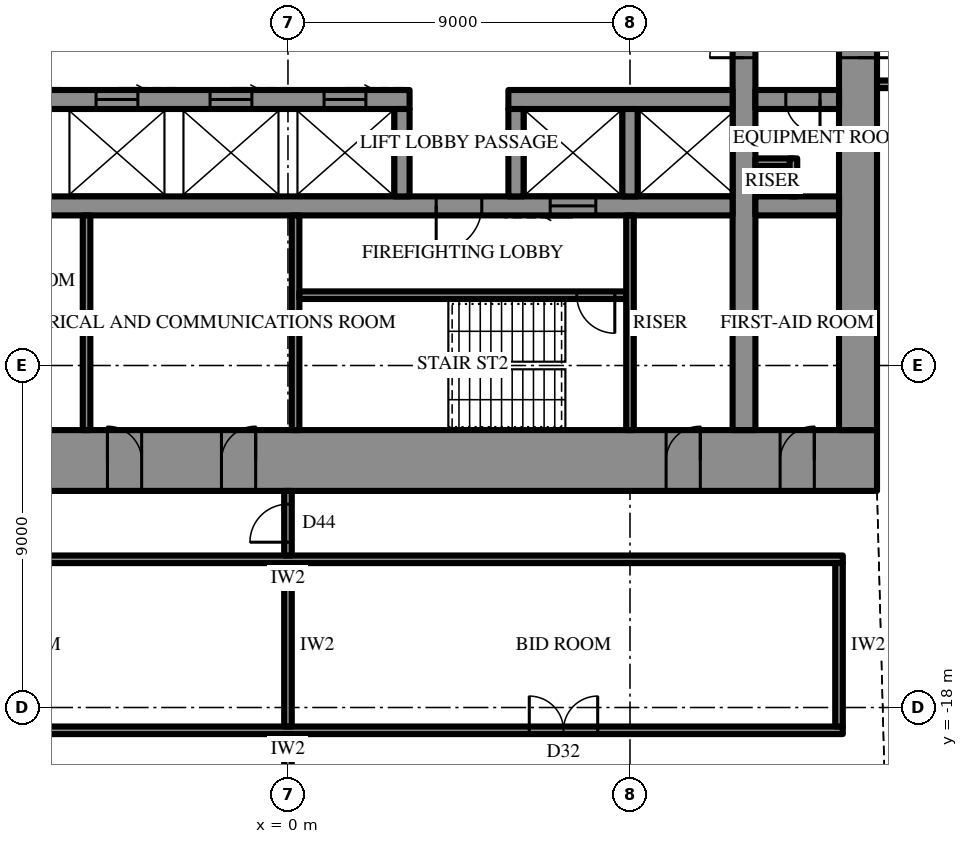
"""IFC4 building model, lengths in metres.
Left out: names, types, materials, properties, quantities, classifications, styles, units other than length and angle.
Written with IfcOpenShell. Run it as: python <this file> out.ifc"""

import sys

from ifc_helpers import new_model, si_unit, direction, frame, frame_2d, origin, place, context, subcontext, project, spatial, rectangle, extrude, element, fill, save


model = new_model("IFC4")
c1 = context("Model", 3, precision=1e-05, world=origin(), true_north=direction((0.0, 1.0)))
c2 = subcontext(c1, "Body", "Model", "MODEL_VIEW")
j1 = project(units=[si_unit("LENGTHUNIT", "METRE"), si_unit("PLANEANGLEUNIT", "RADIAN")], contexts=[c1])
p1 = place(None, origin())
s1 = spatial("IfcSite", under=j1, at=p1, CompositionType="ELEMENT")
p2 = place(p1, origin())
s2 = spatial("IfcBuilding", under=s1, at=p2, CompositionType="ELEMENT")
p3 = place(p2, frame((0.0, 0.0, 265.9)))
s3 = spatial("IfcBuildingStorey", under=s2, at=p3, CompositionType="ELEMENT", Elevation=265.9)
p4 = place(p3, frame((15.5, -11.5, 0.0), z_axis=(0.0, 0.0, 1.0), x_axis=(-1.0, 0.0, 0.0)))
e1 = element("IfcWall", 1, at=p4, inside=s3, PredefinedType="SHEAR", context=c2, shape_type="SweptSolid", body=[
    extrude(rectangle(XDim=31.0, YDim=1.6, at=frame_2d((15.5, 0.0))), origin(), (0.0, 0.0, 1.0), 4.2),
])
p5 = place(p4, frame((16.35, 0.0, 0.0)))
e2 = element("IfcOpeningElement", 2, at=p5, cuts=e1, PredefinedType="OPENING", context=c2, shape_type="SweptSolid", body=[
    extrude(rectangle(XDim=0.9, YDim=2.2, at=frame_2d((0.45, 1.1))), frame((0.0, 0.81, 0.0), z_axis=(0.0, -1.0, 0.0), x_axis=(1.0, 0.0, 0.0)), (0.0, 0.0, 1.0), 1.62),
])
p6 = place(p4, frame((19.35, 0.0, 0.0)))
e3 = element("IfcOpeningElement", 3, at=p6, cuts=e1, PredefinedType="OPENING", context=c2, shape_type="SweptSolid", body=[
    extrude(rectangle(XDim=0.9, YDim=2.2, at=frame_2d((0.45, 1.1))), frame((0.0, 0.81, 0.0), z_axis=(0.0, -1.0, 0.0), x_axis=(1.0, 0.0, 0.0)), (0.0, 0.0, 1.0), 1.62),
])
p7 = place(p4, frame((22.4, 0.0, 0.0)))
e4 = element("IfcOpeningElement", 4, at=p7, cuts=e1, PredefinedType="OPENING", context=c2, shape_type="SweptSolid", body=[
    extrude(rectangle(XDim=1.0, YDim=2.2, at=frame_2d((0.5, 1.1))), frame((0.0, 0.81, 0.0), z_axis=(0.0, -1.0, 0.0), x_axis=(1.0, 0.0, 0.0)), (0.0, 0.0, 1.0), 1.62),
])
p8 = place(p4, frame((1.65, 0.0, 0.0)))
e5 = element("IfcOpeningElement", 5, at=p8, cuts=e1, PredefinedType="OPENING", context=c2, shape_type="SweptSolid", body=[
    extrude(rectangle(XDim=0.9, YDim=2.2, at=frame_2d((0.45, 1.1))), frame((0.0, 0.81, 0.0), z_axis=(0.0, -1.0, 0.0), x_axis=(1.0, 0.0, 0.0)), (0.0, 0.0, 1.0), 1.62),
])
p9 = place(p4, frame((4.65, 0.0, 0.0)))
e6 = element("IfcOpeningElement", 6, at=p9, cuts=e1, PredefinedType="OPENING", context=c2, shape_type="SweptSolid", body=[
    extrude(rectangle(XDim=0.9, YDim=2.2, at=frame_2d((0.45, 1.1))), frame((0.0, 0.81, 0.0), z_axis=(0.0, -1.0, 0.0), x_axis=(1.0, 0.0, 0.0)), (0.0, 0.0, 1.0), 1.62),
])
p10 = place(p4, frame((25.45, 0.0, 0.0)))
e7 = element("IfcOpeningElement", 7, at=p10, cuts=e1, PredefinedType="OPENING", context=c2, shape_type="SweptSolid", body=[
    extrude(rectangle(XDim=0.9, YDim=2.2, at=frame_2d((0.45, 1.1))), frame((0.0, 0.81, 0.0), z_axis=(0.0, -1.0, 0.0), x_axis=(1.0, 0.0, 0.0)), (0.0, 0.0, 1.0), 1.62),
])
p11 = place(p4, frame((28.45, 0.0, 0.0)))
e8 = element("IfcOpeningElement", 8, at=p11, cuts=e1, PredefinedType="OPENING", context=c2, shape_type="SweptSolid", body=[
    extrude(rectangle(XDim=0.9, YDim=2.2, at=frame_2d((0.45, 1.1))), frame((0.0, 0.81, 0.0), z_axis=(0.0, -1.0, 0.0), x_axis=(1.0, 0.0, 0.0)), (0.0, 0.0, 1.0), 1.62),
])
p12 = place(p3, frame((15.0, -10.7, 0.0), z_axis=(0.0, 0.0, 1.0), x_axis=(0.0, 1.0, 0.0)))
e9 = element("IfcWall", 9, at=p12, inside=s3, PredefinedType="SHEAR", context=c2, shape_type="SweptSolid", body=[
    extrude(rectangle(XDim=21.4, YDim=1.0, at=frame_2d((10.7, 0.0))), origin(), (0.0, 0.0, 1.0), 4.2),
])
p13 = place(p12, frame((9.8, 0.0, 0.0)))
e10 = element("IfcOpeningElement", 10, at=p13, cuts=e9, PredefinedType="OPENING", context=c2, shape_type="SweptSolid", body=[
    extrude(rectangle(XDim=1.8, YDim=2.4, at=frame_2d((0.9, 1.2))), frame((0.0, 0.51, 0.0), z_axis=(0.0, -1.0, 0.0), x_axis=(1.0, 0.0, 0.0)), (0.0, 0.0, 1.0), 1.02),
])
p14 = place(p3, frame((12.0, -10.7, 0.0), z_axis=(0.0, 0.0, 1.0), x_axis=(0.0, 1.0, 0.0)))
e11 = element("IfcWall", 11, at=p14, inside=s3, PredefinedType="SHEAR", context=c2, shape_type="SweptSolid", body=[
    extrude(rectangle(XDim=21.4, YDim=0.6, at=frame_2d((10.7, 0.0))), origin(), (0.0, 0.0, 1.0), 4.2),
])
p15 = place(p14, frame((9.8, 0.0, 0.0)))
e12 = element("IfcOpeningElement", 12, at=p15, cuts=e11, PredefinedType="OPENING", context=c2, shape_type="SweptSolid", body=[
    extrude(rectangle(XDim=1.8, YDim=2.4, at=frame_2d((0.9, 1.2))), frame((0.0, 0.31, 0.0), z_axis=(0.0, -1.0, 0.0), x_axis=(1.0, 0.0, 0.0)), (0.0, 0.0, 1.0), 0.62),
])
p16 = place(p3, frame((14.5, -2.0, 0.0), z_axis=(0.0, 0.0, 1.0), x_axis=(-1.0, 0.0, 0.0)))
e13 = element("IfcWall", 13, at=p16, inside=s3, PredefinedType="SHEAR", context=c2, shape_type="SweptSolid", body=[
    extrude(rectangle(XDim=2.2, YDim=0.5, at=frame_2d((1.1, 0.0))), origin(), (0.0, 0.0, 1.0), 4.2),
])
p17 = place(p16, frame((0.5, 0.0, 0.0)))
e14 = element("IfcOpeningElement", 14, at=p17, cuts=e13, PredefinedType="OPENING", context=c2, shape_type="SweptSolid", body=[
    extrude(rectangle(XDim=0.9, YDim=2.2, at=frame_2d((0.45, 1.1))), frame((0.0, 0.26, 0.0), z_axis=(0.0, -1.0, 0.0), x_axis=(1.0, 0.0, 0.0)), (0.0, 0.0, 1.0), 0.52),
])
p18 = place(p3, frame((11.7, -2.0, 0.0), z_axis=(0.0, 0.0, 1.0), x_axis=(-1.0, 0.0, 0.0)))
e15 = element("IfcWall", 15, at=p18, inside=s3, PredefinedType="SHEAR", context=c2, shape_type="SweptSolid", body=[
    extrude(rectangle(XDim=5.9, YDim=0.5, at=frame_2d((2.95, 0.0))), origin(), (0.0, 0.0, 1.0), 4.2),
])
p19 = place(p3, frame((3.2, -2.0, 0.0), z_axis=(0.0, 0.0, 1.0), x_axis=(-1.0, 0.0, 0.0)))
e16 = element("IfcWall", 16, at=p19, inside=s3, PredefinedType="SHEAR", context=c2, shape_type="SweptSolid", body=[
    extrude(rectangle(XDim=14.9, YDim=0.5, at=frame_2d((7.45, 0.0))), origin(), (0.0, 0.0, 1.0), 4.2),
])
p20 = place(p19, frame((1.15, 0.0, 0.0)))
e17 = element("IfcOpeningElement", 17, at=p20, cuts=e16, PredefinedType="OPENING", context=c2, shape_type="SweptSolid", body=[
    extrude(rectangle(XDim=1.1, YDim=2.2, at=frame_2d((0.55, 1.1))), frame((0.0, 0.26, 0.0), z_axis=(0.0, -1.0, 0.0), x_axis=(1.0, 0.0, 0.0)), (0.0, 0.0, 1.0), 0.52),
])
p21 = place(p19, frame((4.15, 0.0, 0.0)))
e18 = element("IfcOpeningElement", 18, at=p21, cuts=e16, PredefinedType="OPENING", context=c2, shape_type="SweptSolid", body=[
    extrude(rectangle(XDim=1.1, YDim=2.2, at=frame_2d((0.55, 1.1))), frame((0.0, 0.26, 0.0), z_axis=(0.0, -1.0, 0.0), x_axis=(1.0, 0.0, 0.0)), (0.0, 0.0, 1.0), 0.52),
])
p22 = place(p19, frame((7.15, 0.0, 0.0)))
e19 = element("IfcOpeningElement", 19, at=p22, cuts=e16, PredefinedType="OPENING", context=c2, shape_type="SweptSolid", body=[
    extrude(rectangle(XDim=1.1, YDim=2.2, at=frame_2d((0.55, 1.1))), frame((0.0, 0.26, 0.0), z_axis=(0.0, -1.0, 0.0), x_axis=(1.0, 0.0, 0.0)), (0.0, 0.0, 1.0), 0.52),
])
p23 = place(p19, frame((10.15, 0.0, 0.0)))
e20 = element("IfcOpeningElement", 20, at=p23, cuts=e16, PredefinedType="OPENING", context=c2, shape_type="SweptSolid", body=[
    extrude(rectangle(XDim=1.1, YDim=2.2, at=frame_2d((0.55, 1.1))), frame((0.0, 0.26, 0.0), z_axis=(0.0, -1.0, 0.0), x_axis=(1.0, 0.0, 0.0)), (0.0, 0.0, 1.0), 0.52),
])
p24 = place(p3, frame((14.5, -4.8, 0.0), z_axis=(0.0, 0.0, 1.0), x_axis=(-1.0, 0.0, 0.0)))
e21 = element("IfcWall", 21, at=p24, inside=s3, PredefinedType="SHEAR", context=c2, shape_type="SweptSolid", body=[
    extrude(rectangle(XDim=2.2, YDim=0.5, at=frame_2d((1.1, 0.0))), origin(), (0.0, 0.0, 1.0), 4.2),
])
p25 = place(p3, frame((11.7, -4.8, 0.0), z_axis=(0.0, 0.0, 1.0), x_axis=(-1.0, 0.0, 0.0)))
e22 = element("IfcWall", 22, at=p25, inside=s3, PredefinedType="SHEAR", context=c2, shape_type="SweptSolid", body=[
    extrude(rectangle(XDim=23.4, YDim=0.5, at=frame_2d((11.7, 0.0))), origin(), (0.0, 0.0, 1.0), 4.2),
])
p26 = place(p25, frame((6.6, 0.0, 0.0)))
e23 = element("IfcOpeningElement", 23, at=p26, cuts=e22, PredefinedType="OPENING", context=c2, shape_type="SweptSolid", body=[
    extrude(rectangle(XDim=1.2, YDim=2.2, at=frame_2d((0.6, 1.1))), frame((0.0, 0.26, 0.0), z_axis=(0.0, -1.0, 0.0), x_axis=(1.0, 0.0, 0.0)), (0.0, 0.0, 1.0), 0.52),
])
p27 = place(p25, frame((3.6, 0.0, 0.0)))
e24 = element("IfcOpeningElement", 24, at=p27, cuts=e22, PredefinedType="OPENING", context=c2, shape_type="SweptSolid", body=[
    extrude(rectangle(XDim=1.2, YDim=2.2, at=frame_2d((0.6, 1.1))), frame((0.0, 0.26, 0.0), z_axis=(0.0, -1.0, 0.0), x_axis=(1.0, 0.0, 0.0)), (0.0, 0.0, 1.0), 0.52),
])
for number, where, z_axis, x_axis in (
    (25, (9.0, -2.25, 0.0), (0.0, 0.0, 1.0), (0.0, -1.0, 0.0)),
    (26, (6.0, -2.25, 0.0), (0.0, 0.0, 1.0), (0.0, -1.0, 0.0)),
    (27, (3.0, -2.25, 0.0), (0.0, 0.0, 1.0), (0.0, -1.0, 0.0)),
):
    element("IfcWall", number, at=place(p3, frame(where, z_axis=z_axis, x_axis=x_axis)), inside=s3, PredefinedType="SHEAR", context=c2, shape_type="SweptSolid", body=[
        extrude(rectangle(XDim=2.3, YDim=0.4, at=frame_2d((1.15, 0.0))), origin(), (0.0, 0.0, 1.0), 4.2),
    ])
p28 = place(p3, frame((0.2, -5.05, 0.0), z_axis=(0.0, 0.0, 1.0), x_axis=(0.0, -1.0, 0.0)))
e28 = element("IfcWall", 28, at=p28, inside=s3, PredefinedType="SHEAR", context=c2, shape_type="SweptSolid", body=[
    extrude(rectangle(XDim=5.65, YDim=0.2, at=frame_2d((2.825, 0.0))), origin(), (0.0, 0.0, 1.0), 4.2),
])
p29 = place(p3, frame((8.9, -7.15, 0.0), z_axis=(0.0, 0.0, 1.0), x_axis=(-1.0, 0.0, 0.0)))
e29 = element("IfcWall", 29, at=p29, inside=s3, PredefinedType="SHEAR", context=c2, shape_type="SweptSolid", body=[
    extrude(rectangle(XDim=8.6, YDim=0.2, at=frame_2d((4.3, 0.0))), origin(), (0.0, 0.0, 1.0), 4.2),
])
p30 = place(p29, frame((0.3, 0.0, 0.0)))
e30 = element("IfcOpeningElement", 30, at=p30, cuts=e29, PredefinedType="OPENING", context=c2, shape_type="SweptSolid", body=[
    extrude(rectangle(XDim=1.0, YDim=2.2, at=frame_2d((0.5, 1.1))), frame((0.0, 0.11, 0.0), z_axis=(0.0, -1.0, 0.0), x_axis=(1.0, 0.0, 0.0)), (0.0, 0.0, 1.0), 0.22),
])
for number, where, z_axis, x_axis in (
    (31, (9.0, -5.05, 0.0), (0.0, 0.0, 1.0), (0.0, -1.0, 0.0)),
    (32, (-5.3, -5.05, 0.0), (0.0, 0.0, 1.0), (0.0, -1.0, 0.0)),
):
    element("IfcWall", number, at=place(p3, frame(where, z_axis=z_axis, x_axis=x_axis)), inside=s3, PredefinedType="PARTITIONING", context=c2, shape_type="SweptSolid", body=[
        extrude(rectangle(XDim=5.65, YDim=0.2, at=frame_2d((2.825, 0.0))), origin(), (0.0, 0.0, 1.0), 4.0),
    ])
for number, where, z_axis, x_axis in (
    (33, (13.3, -3.65, 0.0), (0.0, 0.0, 1.0), (-1.0, 0.0, 0.0)),
    (34, (13.3, -3.55, 0.0), (0.0, 0.0, 1.0), (0.0, -1.0, 0.0)),
):
    element("IfcWall", number, at=place(p3, frame(where, z_axis=z_axis, x_axis=x_axis)), inside=s3, PredefinedType="PARTITIONING", context=c2, shape_type="SweptSolid", body=[
        extrude(rectangle(XDim=1.0, YDim=0.2, at=frame_2d((0.5, 0.0))), origin(), (0.0, 0.0, 1.0), 4.0),
    ])
p31 = place(p3, frame((14.6, -14.1, 0.0), z_axis=(0.0, 0.0, 1.0), x_axis=(-1.0, 0.0, 0.0)))
e35 = element("IfcWall", 35, at=p31, inside=s3, PredefinedType="PARTITIONING", context=c2, shape_type="SweptSolid", body=[
    extrude(rectangle(XDim=29.2, YDim=0.2, at=frame_2d((14.6, 0.0))), origin(), (0.0, 0.0, 1.0), 4.0),
])
p32 = place(p3, frame((14.6, -18.6, 0.0), z_axis=(0.0, 0.0, 1.0), x_axis=(-1.0, 0.0, 0.0)))
e36 = element("IfcWall", 36, at=p32, inside=s3, PredefinedType="PARTITIONING", context=c2, shape_type="SweptSolid", body=[
    extrude(rectangle(XDim=29.2, YDim=0.2, at=frame_2d((14.6, 0.0))), origin(), (0.0, 0.0, 1.0), 4.0),
])
p33 = place(p32, frame((6.45, 0.0, 0.0)))
e37 = element("IfcOpeningElement", 37, at=p33, cuts=e36, PredefinedType="OPENING", context=c2, shape_type="SweptSolid", body=[
    extrude(rectangle(XDim=1.8, YDim=2.4, at=frame_2d((0.9, 1.2))), frame((0.0, 0.11, 0.0), z_axis=(0.0, -1.0, 0.0), x_axis=(1.0, 0.0, 0.0)), (0.0, 0.0, 1.0), 0.22),
])
p34 = place(p32, frame((20.95, 0.0, 0.0)))
e38 = element("IfcOpeningElement", 38, at=p34, cuts=e36, PredefinedType="OPENING", context=c2, shape_type="SweptSolid", body=[
    extrude(rectangle(XDim=1.8, YDim=2.4, at=frame_2d((0.9, 1.2))), frame((0.0, 0.11, 0.0), z_axis=(0.0, -1.0, 0.0), x_axis=(1.0, 0.0, 0.0)), (0.0, 0.0, 1.0), 0.22),
])
p35 = place(p3, frame((14.5, -14.2, 0.0), z_axis=(0.0, 0.0, 1.0), x_axis=(0.0, -1.0, 0.0)))
e39 = element("IfcWall", 39, at=p35, inside=s3, PredefinedType="PARTITIONING", context=c2, shape_type="SweptSolid", body=[
    extrude(rectangle(XDim=4.3, YDim=0.2, at=frame_2d((2.15, 0.0))), origin(), (0.0, 0.0, 1.0), 4.0),
])
p36 = place(p3, frame((0.0, -14.2, 0.0), z_axis=(0.0, 0.0, 1.0), x_axis=(0.0, -1.0, 0.0)))
e40 = element("IfcWall", 40, at=p36, inside=s3, PredefinedType="PARTITIONING", context=c2, shape_type="SweptSolid", body=[
    extrude(rectangle(XDim=4.3, YDim=0.2, at=frame_2d((2.15, 0.0))), origin(), (0.0, 0.0, 1.0), 2.992),
])
p37 = place(p3, frame((15.5, -1.6, 0.0), z_axis=(0.0, 0.0, 1.0), x_axis=(1.0, 0.0, 0.0)))
e41 = element("IfcWall", 41, at=p37, inside=s3, PredefinedType="PARTITIONING", context=c2, shape_type="SweptSolid", body=[
    extrude(rectangle(XDim=9.7, YDim=0.2, at=frame_2d((4.85, 0.0))), origin(), (0.0, 0.0, 1.0), 4.0),
])
p38 = place(p37, frame((6.29, 0.0, 0.0)))
e42 = element("IfcOpeningElement", 42, at=p38, cuts=e41, PredefinedType="OPENING", context=c2, shape_type="SweptSolid", body=[
    extrude(rectangle(XDim=1.0, YDim=2.2, at=frame_2d((0.5, 1.1))), frame((0.0, 0.11, 0.0), z_axis=(0.0, -1.0, 0.0), x_axis=(1.0, 0.0, 0.0)), (0.0, 0.0, 1.0), 0.22),
])
p39 = place(p3, frame((0.0, -12.3, 0.0), z_axis=(0.0, 0.0, 1.0), x_axis=(0.0, -1.0, 0.0)))
e43 = element("IfcWall", 43, at=p39, inside=s3, PredefinedType="PARTITIONING", context=c2, shape_type="SweptSolid", body=[
    extrude(rectangle(XDim=1.7, YDim=0.2, at=frame_2d((0.85, 0.0))), origin(), (0.0, 0.0, 1.0), 2.992),
])
p40 = place(p39, frame((0.35, 0.0, 0.0)))
e44 = element("IfcOpeningElement", 44, at=p40, cuts=e43, PredefinedType="OPENING", context=c2, shape_type="SweptSolid", body=[
    extrude(rectangle(XDim=1.0, YDim=2.2, at=frame_2d((0.5, 1.1))), frame((0.0, 0.11, 0.0), z_axis=(0.0, -1.0, 0.0), x_axis=(1.0, 0.0, 0.0)), (0.0, 0.0, 1.0), 0.22),
])
p41 = place(p3, frame((0.0, -18.7, 0.0), z_axis=(0.0, 0.0, 1.0), x_axis=(0.0, -1.0, 0.0)))
e45 = element("IfcWall", 45, at=p41, inside=s3, PredefinedType="PARTITIONING", context=c2, shape_type="SweptSolid", body=[
    extrude(rectangle(XDim=9.15, YDim=0.2, at=frame_2d((4.575, 0.0))), origin(), (0.0, 0.0, 1.0), 2.992),
])
p42 = place(p13, frame((1.8, 0.0, 0.0), z_axis=(0.0, 0.0, 1.0), x_axis=(-1.0, 0.0, 0.0)))
e46 = element("IfcDoor", 46, at=p42, inside=s3, OperationType="DOUBLE_DOOR_SINGLE_SWING", PredefinedType="DOOR", context=c2, shape_type="SweptSolid", body=[
    extrude(rectangle(XDim=1.8, YDim=2.4, at=frame_2d((0.9, 1.2))), frame((0.0, 0.025, 0.0), z_axis=(0.0, -1.0, 0.0), x_axis=(1.0, 0.0, 0.0)), (0.0, 0.0, 1.0), 0.05),
])
fill(e10, e46)
p43 = place(p26, origin())
e47 = element("IfcDoor", 47, at=p43, inside=s3, OperationType="SINGLE_SWING_LEFT", PredefinedType="DOOR", context=c2, shape_type="SweptSolid", body=[
    extrude(rectangle(XDim=1.2, YDim=2.2, at=frame_2d((0.6, 1.1))), frame((0.0, 0.025, 0.0), z_axis=(0.0, -1.0, 0.0), x_axis=(1.0, 0.0, 0.0)), (0.0, 0.0, 1.0), 0.05),
])
fill(e23, e47)
p44 = place(p30, origin())
e48 = element("IfcDoor", 48, at=p44, inside=s3, OperationType="SINGLE_SWING_RIGHT", PredefinedType="DOOR", context=c2, shape_type="SweptSolid", body=[
    extrude(rectangle(XDim=1.0, YDim=2.2, at=frame_2d((0.5, 1.1))), frame((0.0, 0.025, 0.0), z_axis=(0.0, -1.0, 0.0), x_axis=(1.0, 0.0, 0.0)), (0.0, 0.0, 1.0), 0.05),
])
fill(e30, e48)
p45 = place(p5, frame((0.9, 0.0, 0.0), z_axis=(0.0, 0.0, 1.0), x_axis=(-1.0, 0.0, 0.0)))
e49 = element("IfcDoor", 49, at=p45, inside=s3, OperationType="SINGLE_SWING_LEFT", PredefinedType="DOOR", context=c2, shape_type="SweptSolid", body=[
    extrude(rectangle(XDim=0.9, YDim=2.2, at=frame_2d((0.45, 1.1))), frame((0.0, 0.025, 0.0), z_axis=(0.0, -1.0, 0.0), x_axis=(1.0, 0.0, 0.0)), (0.0, 0.0, 1.0), 0.05),
])
fill(e2, e49)
p46 = place(p6, frame((0.9, 0.0, 0.0), z_axis=(0.0, 0.0, 1.0), x_axis=(-1.0, 0.0, 0.0)))
e50 = element("IfcDoor", 50, at=p46, inside=s3, OperationType="SINGLE_SWING_RIGHT", PredefinedType="DOOR", context=c2, shape_type="SweptSolid", body=[
    extrude(rectangle(XDim=0.9, YDim=2.2, at=frame_2d((0.45, 1.1))), frame((0.0, 0.025, 0.0), z_axis=(0.0, -1.0, 0.0), x_axis=(1.0, 0.0, 0.0)), (0.0, 0.0, 1.0), 0.05),
])
fill(e3, e50)
p47 = place(p8, frame((0.9, 0.0, 0.0), z_axis=(0.0, 0.0, 1.0), x_axis=(-1.0, 0.0, 0.0)))
e51 = element("IfcDoor", 51, at=p47, inside=s3, OperationType="SINGLE_SWING_LEFT", PredefinedType="DOOR", context=c2, shape_type="SweptSolid", body=[
    extrude(rectangle(XDim=0.9, YDim=2.2, at=frame_2d((0.45, 1.1))), frame((0.0, 0.025, 0.0), z_axis=(0.0, -1.0, 0.0), x_axis=(1.0, 0.0, 0.0)), (0.0, 0.0, 1.0), 0.05),
])
fill(e5, e51)
p48 = place(p9, frame((0.9, 0.0, 0.0), z_axis=(0.0, 0.0, 1.0), x_axis=(-1.0, 0.0, 0.0)))
e52 = element("IfcDoor", 52, at=p48, inside=s3, OperationType="SINGLE_SWING_LEFT", PredefinedType="DOOR", context=c2, shape_type="SweptSolid", body=[
    extrude(rectangle(XDim=0.9, YDim=2.2, at=frame_2d((0.45, 1.1))), frame((0.0, 0.025, 0.0), z_axis=(0.0, -1.0, 0.0), x_axis=(1.0, 0.0, 0.0)), (0.0, 0.0, 1.0), 0.05),
])
fill(e6, e52)
p49 = place(p17, origin())
e53 = element("IfcDoor", 53, at=p49, inside=s3, OperationType="SINGLE_SWING_RIGHT", PredefinedType="DOOR", context=c2, shape_type="SweptSolid", body=[
    extrude(rectangle(XDim=0.9, YDim=2.2, at=frame_2d((0.45, 1.1))), frame((0.0, 0.025, 0.0), z_axis=(0.0, -1.0, 0.0), x_axis=(1.0, 0.0, 0.0)), (0.0, 0.0, 1.0), 0.05),
])
fill(e14, e53)
p50 = place(p15, origin())
e54 = element("IfcDoor", 54, at=p50, inside=s3, OperationType="DOUBLE_DOOR_SINGLE_SWING", PredefinedType="DOOR", context=c2, shape_type="SweptSolid", body=[
    extrude(rectangle(XDim=1.8, YDim=2.4, at=frame_2d((0.9, 1.2))), frame((0.0, 0.025, 0.0), z_axis=(0.0, -1.0, 0.0), x_axis=(1.0, 0.0, 0.0)), (0.0, 0.0, 1.0), 0.05),
])
fill(e12, e54)
p51 = place(p27, origin())
e55 = element("IfcDoor", 55, at=p51, inside=s3, OperationType="SLIDING_TO_LEFT", PredefinedType="DOOR", context=c2, shape_type="SweptSolid", body=[
    extrude(rectangle(XDim=1.2, YDim=2.2, at=frame_2d((0.6, 1.1))), frame((0.0, 0.025, 0.0), z_axis=(0.0, -1.0, 0.0), x_axis=(1.0, 0.0, 0.0)), (0.0, 0.0, 1.0), 0.05),
])
fill(e24, e55)
p52 = place(p20, frame((1.1, 0.0, 0.0), z_axis=(0.0, 0.0, 1.0), x_axis=(-1.0, 0.0, 0.0)))
e56 = element("IfcDoor", 56, at=p52, inside=s3, OperationType="SLIDING_TO_LEFT", PredefinedType="DOOR", context=c2, shape_type="SweptSolid", body=[
    extrude(rectangle(XDim=1.1, YDim=2.2, at=frame_2d((0.55, 1.1))), frame((0.0, 0.025, 0.0), z_axis=(0.0, -1.0, 0.0), x_axis=(1.0, 0.0, 0.0)), (0.0, 0.0, 1.0), 0.05),
])
fill(e17, e56)
p53 = place(p21, frame((1.1, 0.0, 0.0), z_axis=(0.0, 0.0, 1.0), x_axis=(-1.0, 0.0, 0.0)))
e57 = element("IfcDoor", 57, at=p53, inside=s3, OperationType="SLIDING_TO_LEFT", PredefinedType="DOOR", context=c2, shape_type="SweptSolid", body=[
    extrude(rectangle(XDim=1.1, YDim=2.2, at=frame_2d((0.55, 1.1))), frame((0.0, 0.025, 0.0), z_axis=(0.0, -1.0, 0.0), x_axis=(1.0, 0.0, 0.0)), (0.0, 0.0, 1.0), 0.05),
])
fill(e18, e57)
p54 = place(p22, frame((1.1, 0.0, 0.0), z_axis=(0.0, 0.0, 1.0), x_axis=(-1.0, 0.0, 0.0)))
e58 = element("IfcDoor", 58, at=p54, inside=s3, OperationType="SLIDING_TO_LEFT", PredefinedType="DOOR", context=c2, shape_type="SweptSolid", body=[
    extrude(rectangle(XDim=1.1, YDim=2.2, at=frame_2d((0.55, 1.1))), frame((0.0, 0.025, 0.0), z_axis=(0.0, -1.0, 0.0), x_axis=(1.0, 0.0, 0.0)), (0.0, 0.0, 1.0), 0.05),
])
fill(e19, e58)
p55 = place(p33, frame((1.8, 0.0, 0.0), z_axis=(0.0, 0.0, 1.0), x_axis=(-1.0, 0.0, 0.0)))
e59 = element("IfcDoor", 59, at=p55, inside=s3, OperationType="DOUBLE_DOOR_SINGLE_SWING", PredefinedType="DOOR", context=c2, shape_type="SweptSolid", body=[
    extrude(rectangle(XDim=1.8, YDim=2.4, at=frame_2d((0.9, 1.2))), frame((0.0, 0.025, 0.0), z_axis=(0.0, -1.0, 0.0), x_axis=(1.0, 0.0, 0.0)), (0.0, 0.0, 1.0), 0.05),
])
fill(e37, e59)
p56 = place(p40, frame((1.0, 0.0, 0.0), z_axis=(0.0, 0.0, 1.0), x_axis=(-1.0, 0.0, 0.0)))
e60 = element("IfcDoor", 60, at=p56, inside=s3, OperationType="SINGLE_SWING_RIGHT", PredefinedType="DOOR", context=c2, shape_type="SweptSolid", body=[
    extrude(rectangle(XDim=1.0, YDim=2.2, at=frame_2d((0.5, 1.1))), frame((0.0, 0.025, 0.0), z_axis=(0.0, -1.0, 0.0), x_axis=(1.0, 0.0, 0.0)), (0.0, 0.0, 1.0), 0.05),
])
fill(e44, e60)
save(model, sys.argv[1])
